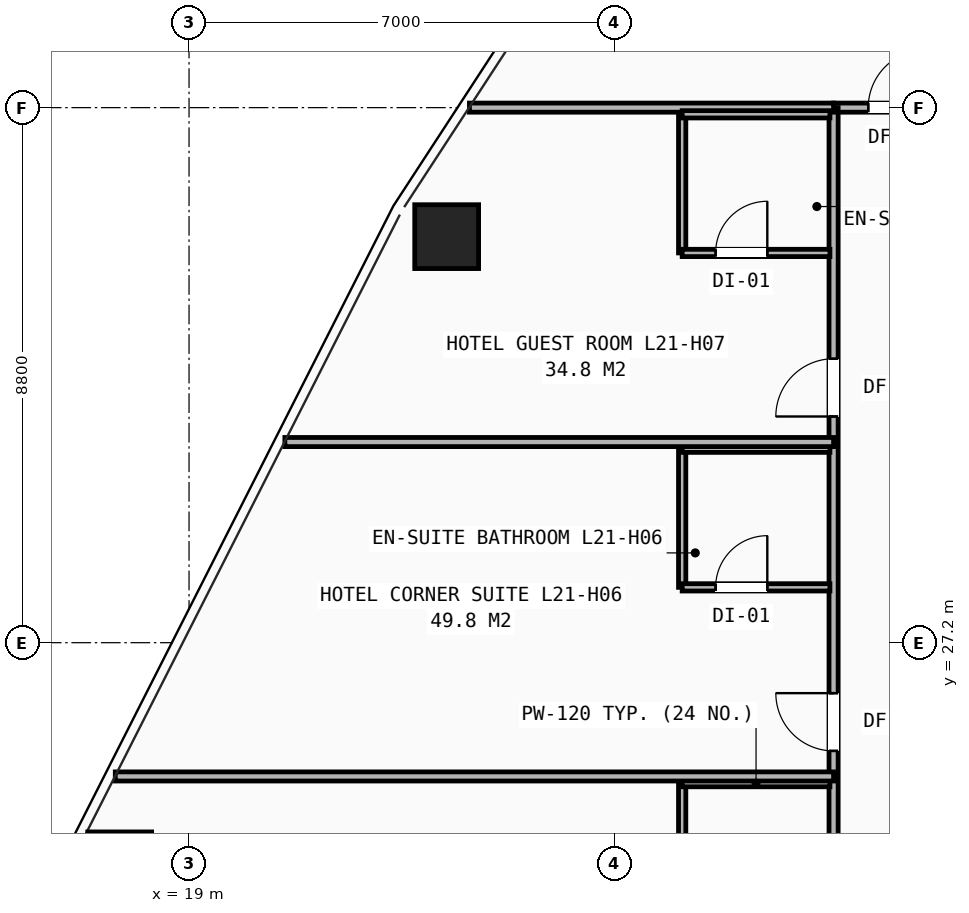
"""IFC4 building model, lengths in metres.
Left out: names, types, materials, properties, quantities, classifications, styles, units other than length and angle.
Written with IfcOpenShell. Run it as: python <this file> out.ifc"""

import sys

from ifc_helpers import new_model, si_unit, direction, frame, frame_2d, origin, origin_2d, place, context, subcontext, project, spatial, rectangle, hollow_rectangle, extrude, element, fill, save


model = new_model("IFC4")
c1 = context("Model", 3, precision=1e-05, world=origin(), true_north=direction((0.0, 1.0)))
c2 = subcontext(c1, "Body", "Model", "MODEL_VIEW")
j1 = project(units=[si_unit("LENGTHUNIT", "METRE"), si_unit("PLANEANGLEUNIT", "RADIAN")], contexts=[c1])
p1 = place(None, origin())
s1 = spatial("IfcSite", under=j1, at=p1, CompositionType="ELEMENT")
p2 = place(p1, origin())
s2 = spatial("IfcBuilding", under=s1, at=p2, CompositionType="ELEMENT")
p3 = place(p2, frame((0.0, 0.0, 76.6)))
s3 = spatial("IfcBuildingStorey", under=s2, at=p3, CompositionType="ELEMENT", Elevation=76.6)
for number, where, z_axis, x_axis in (
    (1, (23.237, 33.878, 0.0), (0.0, 0.0, 1.0), (1.0, 0.0, 0.0)),
    (2, (17.86, 23.563, 0.0), (0.0, 0.0, 1.0), (1.0, 0.0, 0.0)),
):
    element("IfcColumn", number, at=place(p3, frame(where, z_axis=z_axis, x_axis=x_axis)), inside=s3, PredefinedType="COLUMN", context=c2, shape_type="SweptSolid", body=[
        extrude(hollow_rectangle(XDim=1.05, YDim=1.05, WallThickness=0.07, at=origin_2d()), origin(), (0.0, 0.0, 1.0), 3.2),
    ])
p4 = place(p3, frame((29.6, 36.0, 0.0), z_axis=(0.0, 0.0, 1.0), x_axis=(1.0, 0.0, 0.0)))
e3 = element("IfcWall", 3, at=p4, inside=s3, PredefinedType="PARTITIONING", context=c2, shape_type="SweptSolid", body=[
    extrude(rectangle(XDim=9.65, YDim=0.15, at=frame_2d((4.825, 0.0))), origin(), (0.0, 0.0, 1.0), 2.97),
])
p5 = place(p4, frame((0.57, 0.0, 0.0)))
e4 = element("IfcOpeningElement", 4, at=p5, cuts=e3, PredefinedType="OPENING", context=c2, shape_type="SweptSolid", body=[
    extrude(rectangle(XDim=0.95, YDim=2.1, at=frame_2d((0.475, 1.05))), frame((0.0, 0.085, 0.0), z_axis=(0.0, -1.0, 0.0), x_axis=(1.0, 0.0, 0.0)), (0.0, 0.0, 1.0), 0.17),
])
p6 = place(p4, frame((7.02, 0.0, 0.0)))
e5 = element("IfcOpeningElement", 5, at=p6, cuts=e3, PredefinedType="OPENING", context=c2, shape_type="SweptSolid", body=[
    extrude(rectangle(XDim=0.95, YDim=2.1, at=frame_2d((0.475, 1.05))), frame((0.0, 0.085, 0.0), z_axis=(0.0, -1.0, 0.0), x_axis=(1.0, 0.0, 0.0)), (0.0, 0.0, 1.0), 0.17),
])
p7 = place(p3, frame((29.6, 14.1, 0.0), z_axis=(0.0, 0.0, 1.0), x_axis=(0.0, 1.0, 0.0)))
e6 = element("IfcWall", 6, at=p7, inside=s3, PredefinedType="PARTITIONING", context=c2, shape_type="SweptSolid", body=[
    extrude(rectangle(XDim=21.9, YDim=0.15, at=frame_2d((10.95, 0.0))), origin(), (0.0, 0.0, 1.0), 2.421),
])
p8 = place(p7, frame((0.42, 0.0, 0.0)))
e7 = element("IfcOpeningElement", 7, at=p8, cuts=e6, PredefinedType="OPENING", context=c2, shape_type="SweptSolid", body=[
    extrude(rectangle(XDim=0.95, YDim=2.1, at=frame_2d((0.475, 1.05))), frame((0.0, 0.085, 0.0), z_axis=(0.0, -1.0, 0.0), x_axis=(1.0, 0.0, 0.0)), (0.0, 0.0, 1.0), 0.17),
])
p9 = place(p7, frame((5.82, 0.0, 0.0)))
e8 = element("IfcOpeningElement", 8, at=p9, cuts=e6, PredefinedType="OPENING", context=c2, shape_type="SweptSolid", body=[
    extrude(rectangle(XDim=0.95, YDim=2.1, at=frame_2d((0.475, 1.05))), frame((0.0, 0.085, 0.0), z_axis=(0.0, -1.0, 0.0), x_axis=(1.0, 0.0, 0.0)), (0.0, 0.0, 1.0), 0.17),
])
p10 = place(p7, frame((11.32, 0.0, 0.0)))
e9 = element("IfcOpeningElement", 9, at=p10, cuts=e6, PredefinedType="OPENING", context=c2, shape_type="SweptSolid", body=[
    extrude(rectangle(XDim=0.95, YDim=2.1, at=frame_2d((0.475, 1.05))), frame((0.0, 0.085, 0.0), z_axis=(0.0, -1.0, 0.0), x_axis=(1.0, 0.0, 0.0)), (0.0, 0.0, 1.0), 0.17),
])
p11 = place(p7, frame((16.82, 0.0, 0.0)))
e10 = element("IfcOpeningElement", 10, at=p11, cuts=e6, PredefinedType="OPENING", context=c2, shape_type="SweptSolid", body=[
    extrude(rectangle(XDim=0.95, YDim=2.1, at=frame_2d((0.475, 1.05))), frame((0.0, 0.085, 0.0), z_axis=(0.0, -1.0, 0.0), x_axis=(1.0, 0.0, 0.0)), (0.0, 0.0, 1.0), 0.17),
])
p12 = place(p3, frame((23.611, 36.0, 0.0), z_axis=(0.0, 0.0, 1.0), x_axis=(1.0, 0.0, 0.0)))
e11 = element("IfcWall", 11, at=p12, inside=s3, PredefinedType="PARTITIONING", context=c2, shape_type="SweptSolid", body=[
    extrude(rectangle(XDim=5.989, YDim=0.15, at=frame_2d((2.994, 0.0))), origin(), (0.0, 0.0, 1.0), 2.258),
])
p13 = place(p3, frame((27.11, 22.61, 0.0), z_axis=(0.0, 0.0, 1.0), x_axis=(0.0, 1.0, 0.0)))
e12 = element("IfcWall", 12, at=p13, inside=s3, PredefinedType="PARTITIONING", context=c2, shape_type="SweptSolid", body=[
    extrude(rectangle(XDim=2.28, YDim=0.12, at=frame_2d((1.14, 0.0))), origin(), (0.0, 0.0, 1.0), 2.97),
])
p14 = place(p3, frame((27.11, 24.89, 0.0), z_axis=(0.0, 0.0, 1.0), x_axis=(1.0, 0.0, 0.0)))
e13 = element("IfcWall", 13, at=p14, inside=s3, PredefinedType="PARTITIONING", context=c2, shape_type="SweptSolid", body=[
    extrude(rectangle(XDim=2.43, YDim=0.12, at=frame_2d((1.215, 0.0))), origin(), (0.0, 0.0, 1.0), 2.97),
])
p15 = place(p3, frame((17.787, 25.0, 0.0), z_axis=(0.0, 0.0, 1.0), x_axis=(1.0, 0.0, 0.0)))
e14 = element("IfcWall", 14, at=p15, inside=s3, PredefinedType="PARTITIONING", context=c2, shape_type="SweptSolid", body=[
    extrude(rectangle(XDim=11.813, YDim=0.15, at=frame_2d((5.907, 0.0))), origin(), (0.0, 0.0, 1.0), 2.258),
])
p16 = place(p3, frame((27.11, 28.11, 0.0), z_axis=(0.0, 0.0, 1.0), x_axis=(0.0, 1.0, 0.0)))
e15 = element("IfcWall", 15, at=p16, inside=s3, PredefinedType="PARTITIONING", context=c2, shape_type="SweptSolid", body=[
    extrude(rectangle(XDim=2.28, YDim=0.12, at=frame_2d((1.14, 0.0))), origin(), (0.0, 0.0, 1.0), 2.97),
])
p17 = place(p3, frame((27.11, 28.11, 0.0), z_axis=(0.0, 0.0, 1.0), x_axis=(1.0, 0.0, 0.0)))
e16 = element("IfcWall", 16, at=p17, inside=s3, PredefinedType="PARTITIONING", context=c2, shape_type="SweptSolid", body=[
    extrude(rectangle(XDim=2.43, YDim=0.12, at=frame_2d((1.215, 0.0))), origin(), (0.0, 0.0, 1.0), 2.97),
])
p18 = place(p17, frame((0.55, 0.0, 0.0)))
e17 = element("IfcOpeningElement", 17, at=p18, cuts=e16, PredefinedType="OPENING", context=c2, shape_type="SweptSolid", body=[
    extrude(rectangle(XDim=0.85, YDim=2.05, at=frame_2d((0.425, 1.025))), frame((0.0, 0.07, 0.0), z_axis=(0.0, -1.0, 0.0), x_axis=(1.0, 0.0, 0.0)), (0.0, 0.0, 1.0), 0.14),
])
p19 = place(p3, frame((27.11, 30.39, 0.0), z_axis=(0.0, 0.0, 1.0), x_axis=(1.0, 0.0, 0.0)))
e18 = element("IfcWall", 18, at=p19, inside=s3, PredefinedType="PARTITIONING", context=c2, shape_type="SweptSolid", body=[
    extrude(rectangle(XDim=2.43, YDim=0.12, at=frame_2d((1.215, 0.0))), origin(), (0.0, 0.0, 1.0), 2.97),
])
p20 = place(p3, frame((20.576, 30.5, 0.0), z_axis=(0.0, 0.0, 1.0), x_axis=(1.0, 0.0, 0.0)))
e19 = element("IfcWall", 19, at=p20, inside=s3, PredefinedType="PARTITIONING", context=c2, shape_type="SweptSolid", body=[
    extrude(rectangle(XDim=9.024, YDim=0.15, at=frame_2d((4.512, 0.0))), origin(), (0.0, 0.0, 1.0), 2.258),
])
p21 = place(p3, frame((27.11, 33.61, 0.0), z_axis=(0.0, 0.0, 1.0), x_axis=(0.0, 1.0, 0.0)))
e20 = element("IfcWall", 20, at=p21, inside=s3, PredefinedType="PARTITIONING", context=c2, shape_type="SweptSolid", body=[
    extrude(rectangle(XDim=2.28, YDim=0.12, at=frame_2d((1.14, 0.0))), origin(), (0.0, 0.0, 1.0), 2.503),
])
p22 = place(p3, frame((27.11, 33.61, 0.0), z_axis=(0.0, 0.0, 1.0), x_axis=(1.0, 0.0, 0.0)))
e21 = element("IfcWall", 21, at=p22, inside=s3, PredefinedType="PARTITIONING", context=c2, shape_type="SweptSolid", body=[
    extrude(rectangle(XDim=2.43, YDim=0.12, at=frame_2d((1.215, 0.0))), origin(), (0.0, 0.0, 1.0), 2.503),
])
p23 = place(p22, frame((0.55, 0.0, 0.0)))
e22 = element("IfcOpeningElement", 22, at=p23, cuts=e21, PredefinedType="OPENING", context=c2, shape_type="SweptSolid", body=[
    extrude(rectangle(XDim=0.85, YDim=2.05, at=frame_2d((0.425, 1.025))), frame((0.0, 0.07, 0.0), z_axis=(0.0, -1.0, 0.0), x_axis=(1.0, 0.0, 0.0)), (0.0, 0.0, 1.0), 0.14),
])
p24 = place(p3, frame((27.11, 35.89, 0.0), z_axis=(0.0, 0.0, 1.0), x_axis=(1.0, 0.0, 0.0)))
e23 = element("IfcWall", 23, at=p24, inside=s3, PredefinedType="PARTITIONING", context=c2, shape_type="SweptSolid", body=[
    extrude(rectangle(XDim=2.43, YDim=0.12, at=frame_2d((1.215, 0.0))), origin(), (0.0, 0.0, 1.0), 2.503),
])
p25 = place(p10, origin())
e24 = element("IfcDoor", 24, at=p25, inside=s3, OperationType="SINGLE_SWING_RIGHT", PredefinedType="DOOR", context=c2, shape_type="SweptSolid", body=[
    extrude(rectangle(XDim=0.95, YDim=2.1, at=frame_2d((0.475, 1.05))), frame((0.0, 0.025, 0.0), z_axis=(0.0, -1.0, 0.0), x_axis=(1.0, 0.0, 0.0)), (0.0, 0.0, 1.0), 0.05),
])
fill(e9, e24)
p26 = place(p18, origin())
e25 = element("IfcDoor", 25, at=p26, inside=s3, OperationType="SINGLE_SWING_RIGHT", PredefinedType="DOOR", context=c2, shape_type="SweptSolid", body=[
    extrude(rectangle(XDim=0.85, YDim=2.05, at=frame_2d((0.425, 1.025))), frame((0.0, 0.025, 0.0), z_axis=(0.0, -1.0, 0.0), x_axis=(1.0, 0.0, 0.0)), (0.0, 0.0, 1.0), 0.05),
])
fill(e17, e25)
p27 = place(p11, origin())
e26 = element("IfcDoor", 26, at=p27, inside=s3, OperationType="SINGLE_SWING_LEFT", PredefinedType="DOOR", context=c2, shape_type="SweptSolid", body=[
    extrude(rectangle(XDim=0.95, YDim=2.1, at=frame_2d((0.475, 1.05))), frame((0.0, 0.025, 0.0), z_axis=(0.0, -1.0, 0.0), x_axis=(1.0, 0.0, 0.0)), (0.0, 0.0, 1.0), 0.05),
])
fill(e10, e26)
p28 = place(p23, origin())
e27 = element("IfcDoor", 27, at=p28, inside=s3, OperationType="SINGLE_SWING_RIGHT", PredefinedType="DOOR", context=c2, shape_type="SweptSolid", body=[
    extrude(rectangle(XDim=0.85, YDim=2.05, at=frame_2d((0.425, 1.025))), frame((0.0, 0.025, 0.0), z_axis=(0.0, -1.0, 0.0), x_axis=(1.0, 0.0, 0.0)), (0.0, 0.0, 1.0), 0.05),
])
fill(e22, e27)
p29 = place(p5, origin())
e28 = element("IfcDoor", 28, at=p29, inside=s3, OperationType="SINGLE_SWING_RIGHT", PredefinedType="DOOR", context=c2, shape_type="SweptSolid", body=[
    extrude(rectangle(XDim=0.95, YDim=2.1, at=frame_2d((0.475, 1.05))), frame((0.0, 0.025, 0.0), z_axis=(0.0, -1.0, 0.0), x_axis=(1.0, 0.0, 0.0)), (0.0, 0.0, 1.0), 0.05),
])
fill(e4, e28)
save(model, sys.argv[1])
